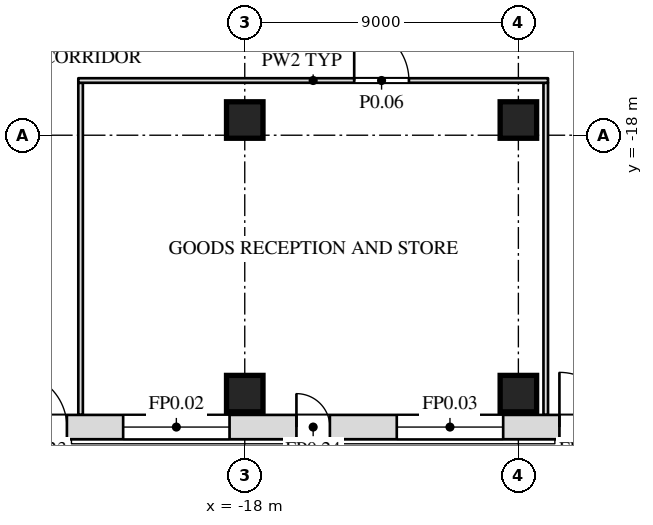
"""IFC4 building model, lengths in metres.
Left out: names, types, materials, properties, quantities, classifications, styles, units other than length and angle.
Written with IfcOpenShell. Run it as: python <this file> out.ifc"""

import sys

from ifc_helpers import new_model, si_unit, direction, frame, frame_2d, origin, origin_2d, place, context, subcontext, project, spatial, rectangle, extrude, element, fill, save


model = new_model("IFC4")
c1 = context("Model", 3, precision=1e-05, world=origin(), true_north=direction((0.0, 1.0)))
c2 = subcontext(c1, "Body", "Model", "MODEL_VIEW")
j1 = project(units=[si_unit("LENGTHUNIT", "METRE"), si_unit("PLANEANGLEUNIT", "RADIAN")], contexts=[c1])
p1 = place(None, origin())
s1 = spatial("IfcSite", under=j1, at=p1, CompositionType="ELEMENT")
p2 = place(p1, origin())
s2 = spatial("IfcBuilding", under=s1, at=p2, CompositionType="ELEMENT")
p3 = place(p2, origin())
s3 = spatial("IfcBuildingStorey", under=s2, at=p3, CompositionType="ELEMENT", Elevation=0.0)
for number, where, z_axis, x_axis in (
    (1, (-18.0, -26.5, 0.0), (0.0, 0.0, 1.0), (1.0, 0.0, 0.0)),
    (2, (-9.0, -26.5, 0.0), (0.0, 0.0, 1.0), (1.0, 0.0, 0.0)),
    (3, (-18.0, -17.5, 0.0), (0.0, 0.0, 1.0), (1.0, 0.0, 0.0)),
    (4, (-9.0, -17.5, 0.0), (0.0, 0.0, 1.0), (1.0, 0.0, 0.0)),
):
    element("IfcColumn", number, at=place(p3, frame(where, z_axis=z_axis, x_axis=x_axis)), inside=s3, PredefinedType="COLUMN", context=c2, shape_type="SweptSolid", body=[
        extrude(rectangle(XDim=1.2, YDim=1.2, at=origin_2d()), origin(), (0.0, 0.0, 1.0), 9.0),
    ])
for number, where, z_axis, x_axis in (
    (5, (-23.4, -27.2, 0.0), (0.0, 0.0, 1.0), (0.0, 1.0, 0.0)),
    (6, (-8.1, -27.2, 0.0), (0.0, 0.0, 1.0), (0.0, 1.0, 0.0)),
):
    element("IfcWall", number, at=place(p3, frame(where, z_axis=z_axis, x_axis=x_axis)), inside=s3, PredefinedType="PARTITIONING", context=c2, shape_type="SweptSolid", body=[
        extrude(rectangle(XDim=10.925, YDim=0.15, at=frame_2d((5.462, 0.0))), origin(), (0.0, 0.0, 1.0), 8.7),
    ])
p4 = place(p3, frame((-23.475, -16.2, 0.0), z_axis=(0.0, 0.0, 1.0), x_axis=(1.0, 0.0, 0.0)))
e7 = element("IfcWall", 7, at=p4, inside=s3, PredefinedType="PARTITIONING", context=c2, shape_type="SweptSolid", body=[
    extrude(rectangle(XDim=15.45, YDim=0.15, at=frame_2d((7.725, 0.0))), origin(), (0.0, 0.0, 1.0), 8.7),
])
p5 = place(p4, frame((9.075, 0.0, 0.0)))
e8 = element("IfcOpeningElement", 8, at=p5, cuts=e7, PredefinedType="OPENING", context=c2, shape_type="SweptSolid", body=[
    extrude(rectangle(XDim=1.8, YDim=2.1, at=frame_2d((0.9, 1.05))), frame((0.0, 0.087, 0.0), z_axis=(0.0, -1.0, 0.0), x_axis=(1.0, 0.0, 0.0)), (0.0, 0.0, 1.0), 0.174),
])
p6 = place(p3, frame((-32.948, -27.6, 0.0), z_axis=(0.0, 0.0, 1.0), x_axis=(1.0, 0.0, 0.0)))
e9 = element("IfcWall", 9, at=p6, inside=s3, PredefinedType="SOLIDWALL", context=c2, shape_type="SweptSolid", body=[
    extrude(rectangle(XDim=65.895, YDim=0.8, at=frame_2d((32.948, 0.0))), origin(), (0.0, 0.0, 1.0), 8.7),
])
p7 = place(p6, frame((1.948, 0.0, 1.0)))
e10 = element("IfcOpeningElement", 10, at=p7, cuts=e9, PredefinedType="OPENING", context=c2, shape_type="SweptSolid", body=[
    extrude(rectangle(XDim=3.5, YDim=5.5, at=frame_2d((1.75, 2.75))), frame((0.0, 0.412, 0.0), z_axis=(0.0, -1.0, 0.0), x_axis=(1.0, 0.0, 0.0)), (0.0, 0.0, 1.0), 0.824),
])
p8 = place(p6, frame((10.948, 0.0, 1.0)))
e11 = element("IfcOpeningElement", 11, at=p8, cuts=e9, PredefinedType="OPENING", context=c2, shape_type="SweptSolid", body=[
    extrude(rectangle(XDim=3.5, YDim=5.5, at=frame_2d((1.75, 2.75))), frame((0.0, 0.412, 0.0), z_axis=(0.0, -1.0, 0.0), x_axis=(1.0, 0.0, 0.0)), (0.0, 0.0, 1.0), 0.824),
])
p9 = place(p6, frame((19.948, 0.0, 1.0)))
e12 = element("IfcOpeningElement", 12, at=p9, cuts=e9, PredefinedType="OPENING", context=c2, shape_type="SweptSolid", body=[
    extrude(rectangle(XDim=3.5, YDim=5.5, at=frame_2d((1.75, 2.75))), frame((0.0, 0.412, 0.0), z_axis=(0.0, -1.0, 0.0), x_axis=(1.0, 0.0, 0.0)), (0.0, 0.0, 1.0), 0.824),
])
p10 = place(p6, frame((42.448, 0.0, 1.0)))
e13 = element("IfcOpeningElement", 13, at=p10, cuts=e9, PredefinedType="OPENING", context=c2, shape_type="SweptSolid", body=[
    extrude(rectangle(XDim=3.5, YDim=5.5, at=frame_2d((1.75, 2.75))), frame((0.0, 0.412, 0.0), z_axis=(0.0, -1.0, 0.0), x_axis=(1.0, 0.0, 0.0)), (0.0, 0.0, 1.0), 0.824),
])
p11 = place(p6, frame((51.448, 0.0, 1.0)))
e14 = element("IfcOpeningElement", 14, at=p11, cuts=e9, PredefinedType="OPENING", context=c2, shape_type="SweptSolid", body=[
    extrude(rectangle(XDim=3.5, YDim=5.5, at=frame_2d((1.75, 2.75))), frame((0.0, 0.412, 0.0), z_axis=(0.0, -1.0, 0.0), x_axis=(1.0, 0.0, 0.0)), (0.0, 0.0, 1.0), 0.824),
])
p12 = place(p6, frame((60.448, 0.0, 1.0)))
e15 = element("IfcOpeningElement", 15, at=p12, cuts=e9, PredefinedType="OPENING", context=c2, shape_type="SweptSolid", body=[
    extrude(rectangle(XDim=3.5, YDim=5.5, at=frame_2d((1.75, 2.75))), frame((0.0, 0.412, 0.0), z_axis=(0.0, -1.0, 0.0), x_axis=(1.0, 0.0, 0.0)), (0.0, 0.0, 1.0), 0.824),
])
p13 = place(p6, frame((7.298, 0.0, 0.0)))
e16 = element("IfcOpeningElement", 16, at=p13, cuts=e9, PredefinedType="OPENING", context=c2, shape_type="SweptSolid", body=[
    extrude(rectangle(XDim=1.8, YDim=2.4, at=frame_2d((0.9, 1.2))), frame((0.0, 0.412, 0.0), z_axis=(0.0, -1.0, 0.0), x_axis=(1.0, 0.0, 0.0)), (0.0, 0.0, 1.0), 0.824),
])
p14 = place(p6, frame((16.648, 0.0, 0.0)))
e17 = element("IfcOpeningElement", 17, at=p14, cuts=e9, PredefinedType="OPENING", context=c2, shape_type="SweptSolid", body=[
    extrude(rectangle(XDim=1.1, YDim=2.4, at=frame_2d((0.55, 1.2))), frame((0.0, 0.412, 0.0), z_axis=(0.0, -1.0, 0.0), x_axis=(1.0, 0.0, 0.0)), (0.0, 0.0, 1.0), 0.824),
])
p15 = place(p6, frame((25.298, 0.0, 0.0)))
e18 = element("IfcOpeningElement", 18, at=p15, cuts=e9, PredefinedType="OPENING", context=c2, shape_type="SweptSolid", body=[
    extrude(rectangle(XDim=1.8, YDim=2.4, at=frame_2d((0.9, 1.2))), frame((0.0, 0.412, 0.0), z_axis=(0.0, -1.0, 0.0), x_axis=(1.0, 0.0, 0.0)), (0.0, 0.0, 1.0), 0.824),
])
p16 = place(p6, frame((28.498, 0.0, 0.0)))
e19 = element("IfcOpeningElement", 19, at=p16, cuts=e9, PredefinedType="OPENING", context=c2, shape_type="SweptSolid", body=[
    extrude(rectangle(XDim=3.5, YDim=4.5, at=frame_2d((1.75, 2.25))), frame((0.0, 0.412, 0.0), z_axis=(0.0, -1.0, 0.0), x_axis=(1.0, 0.0, 0.0)), (0.0, 0.0, 1.0), 0.824),
])
p17 = place(p6, frame((33.898, 0.0, 0.0)))
e20 = element("IfcOpeningElement", 20, at=p17, cuts=e9, PredefinedType="OPENING", context=c2, shape_type="SweptSolid", body=[
    extrude(rectangle(XDim=3.5, YDim=4.5, at=frame_2d((1.75, 2.25))), frame((0.0, 0.412, 0.0), z_axis=(0.0, -1.0, 0.0), x_axis=(1.0, 0.0, 0.0)), (0.0, 0.0, 1.0), 0.824),
])
p18 = place(p6, frame((38.798, 0.0, 0.0)))
e21 = element("IfcOpeningElement", 21, at=p18, cuts=e9, PredefinedType="OPENING", context=c2, shape_type="SweptSolid", body=[
    extrude(rectangle(XDim=1.8, YDim=2.4, at=frame_2d((0.9, 1.2))), frame((0.0, 0.412, 0.0), z_axis=(0.0, -1.0, 0.0), x_axis=(1.0, 0.0, 0.0)), (0.0, 0.0, 1.0), 0.824),
])
p19 = place(p6, frame((48.148, 0.0, 0.0)))
e22 = element("IfcOpeningElement", 22, at=p19, cuts=e9, PredefinedType="OPENING", context=c2, shape_type="SweptSolid", body=[
    extrude(rectangle(XDim=1.1, YDim=2.4, at=frame_2d((0.55, 1.2))), frame((0.0, 0.412, 0.0), z_axis=(0.0, -1.0, 0.0), x_axis=(1.0, 0.0, 0.0)), (0.0, 0.0, 1.0), 0.824),
])
p20 = place(p6, frame((56.798, 0.0, 0.0)))
e23 = element("IfcOpeningElement", 23, at=p20, cuts=e9, PredefinedType="OPENING", context=c2, shape_type="SweptSolid", body=[
    extrude(rectangle(XDim=1.8, YDim=2.4, at=frame_2d((0.9, 1.2))), frame((0.0, 0.412, 0.0), z_axis=(0.0, -1.0, 0.0), x_axis=(1.0, 0.0, 0.0)), (0.0, 0.0, 1.0), 0.824),
])
p21 = place(p5, origin())
e24 = element("IfcDoor", 24, at=p21, inside=s3, OperationType="DOUBLE_DOOR_SINGLE_SWING", PredefinedType="DOOR", context=c2, shape_type="SweptSolid", body=[
    extrude(rectangle(XDim=1.8, YDim=2.1, at=frame_2d((0.9, 1.05))), frame((0.0, 0.025, 0.0), z_axis=(0.0, -1.0, 0.0), x_axis=(1.0, 0.0, 0.0)), (0.0, 0.0, 1.0), 0.05),
])
fill(e8, e24)
p22 = place(p8, origin())
e25 = element("IfcWindow", 25, at=p22, inside=s3, PartitioningType="SINGLE_PANEL", PredefinedType="WINDOW", context=c2, shape_type="SweptSolid", body=[
    extrude(rectangle(XDim=3.5, YDim=5.5, at=frame_2d((1.75, 2.75))), frame((0.0, 0.03, 0.0), z_axis=(0.0, -1.0, 0.0), x_axis=(1.0, 0.0, 0.0)), (0.0, 0.0, 1.0), 0.06),
])
fill(e11, e25)
p23 = place(p9, origin())
e26 = element("IfcWindow", 26, at=p23, inside=s3, PartitioningType="SINGLE_PANEL", PredefinedType="WINDOW", context=c2, shape_type="SweptSolid", body=[
    extrude(rectangle(XDim=3.5, YDim=5.5, at=frame_2d((1.75, 2.75))), frame((0.0, 0.03, 0.0), z_axis=(0.0, -1.0, 0.0), x_axis=(1.0, 0.0, 0.0)), (0.0, 0.0, 1.0), 0.06),
])
fill(e12, e26)
p24 = place(p13, frame((1.8, 0.0, 0.0), z_axis=(0.0, 0.0, 1.0), x_axis=(-1.0, 0.0, 0.0)))
e27 = element("IfcDoor", 27, at=p24, inside=s3, OperationType="DOUBLE_DOOR_SINGLE_SWING", PredefinedType="DOOR", context=c2, shape_type="SweptSolid", body=[
    extrude(rectangle(XDim=1.8, YDim=2.4, at=frame_2d((0.9, 1.2))), frame((0.0, 0.025, 0.0), z_axis=(0.0, -1.0, 0.0), x_axis=(1.0, 0.0, 0.0)), (0.0, 0.0, 1.0), 0.05),
])
fill(e16, e27)
p25 = place(p14, frame((1.1, 0.0, 0.0), z_axis=(0.0, 0.0, 1.0), x_axis=(-1.0, 0.0, 0.0)))
e28 = element("IfcDoor", 28, at=p25, inside=s3, OperationType="SINGLE_SWING_LEFT", PredefinedType="DOOR", context=c2, shape_type="SweptSolid", body=[
    extrude(rectangle(XDim=1.1, YDim=2.4, at=frame_2d((0.55, 1.2))), frame((0.0, 0.025, 0.0), z_axis=(0.0, -1.0, 0.0), x_axis=(1.0, 0.0, 0.0)), (0.0, 0.0, 1.0), 0.05),
])
fill(e17, e28)
p26 = place(p15, frame((1.8, 0.0, 0.0), z_axis=(0.0, 0.0, 1.0), x_axis=(-1.0, 0.0, 0.0)))
e29 = element("IfcDoor", 29, at=p26, inside=s3, OperationType="DOUBLE_DOOR_SINGLE_SWING", PredefinedType="DOOR", context=c2, shape_type="SweptSolid", body=[
    extrude(rectangle(XDim=1.8, YDim=2.4, at=frame_2d((0.9, 1.2))), frame((0.0, 0.025, 0.0), z_axis=(0.0, -1.0, 0.0), x_axis=(1.0, 0.0, 0.0)), (0.0, 0.0, 1.0), 0.05),
])
fill(e18, e29)
save(model, sys.argv[1])
